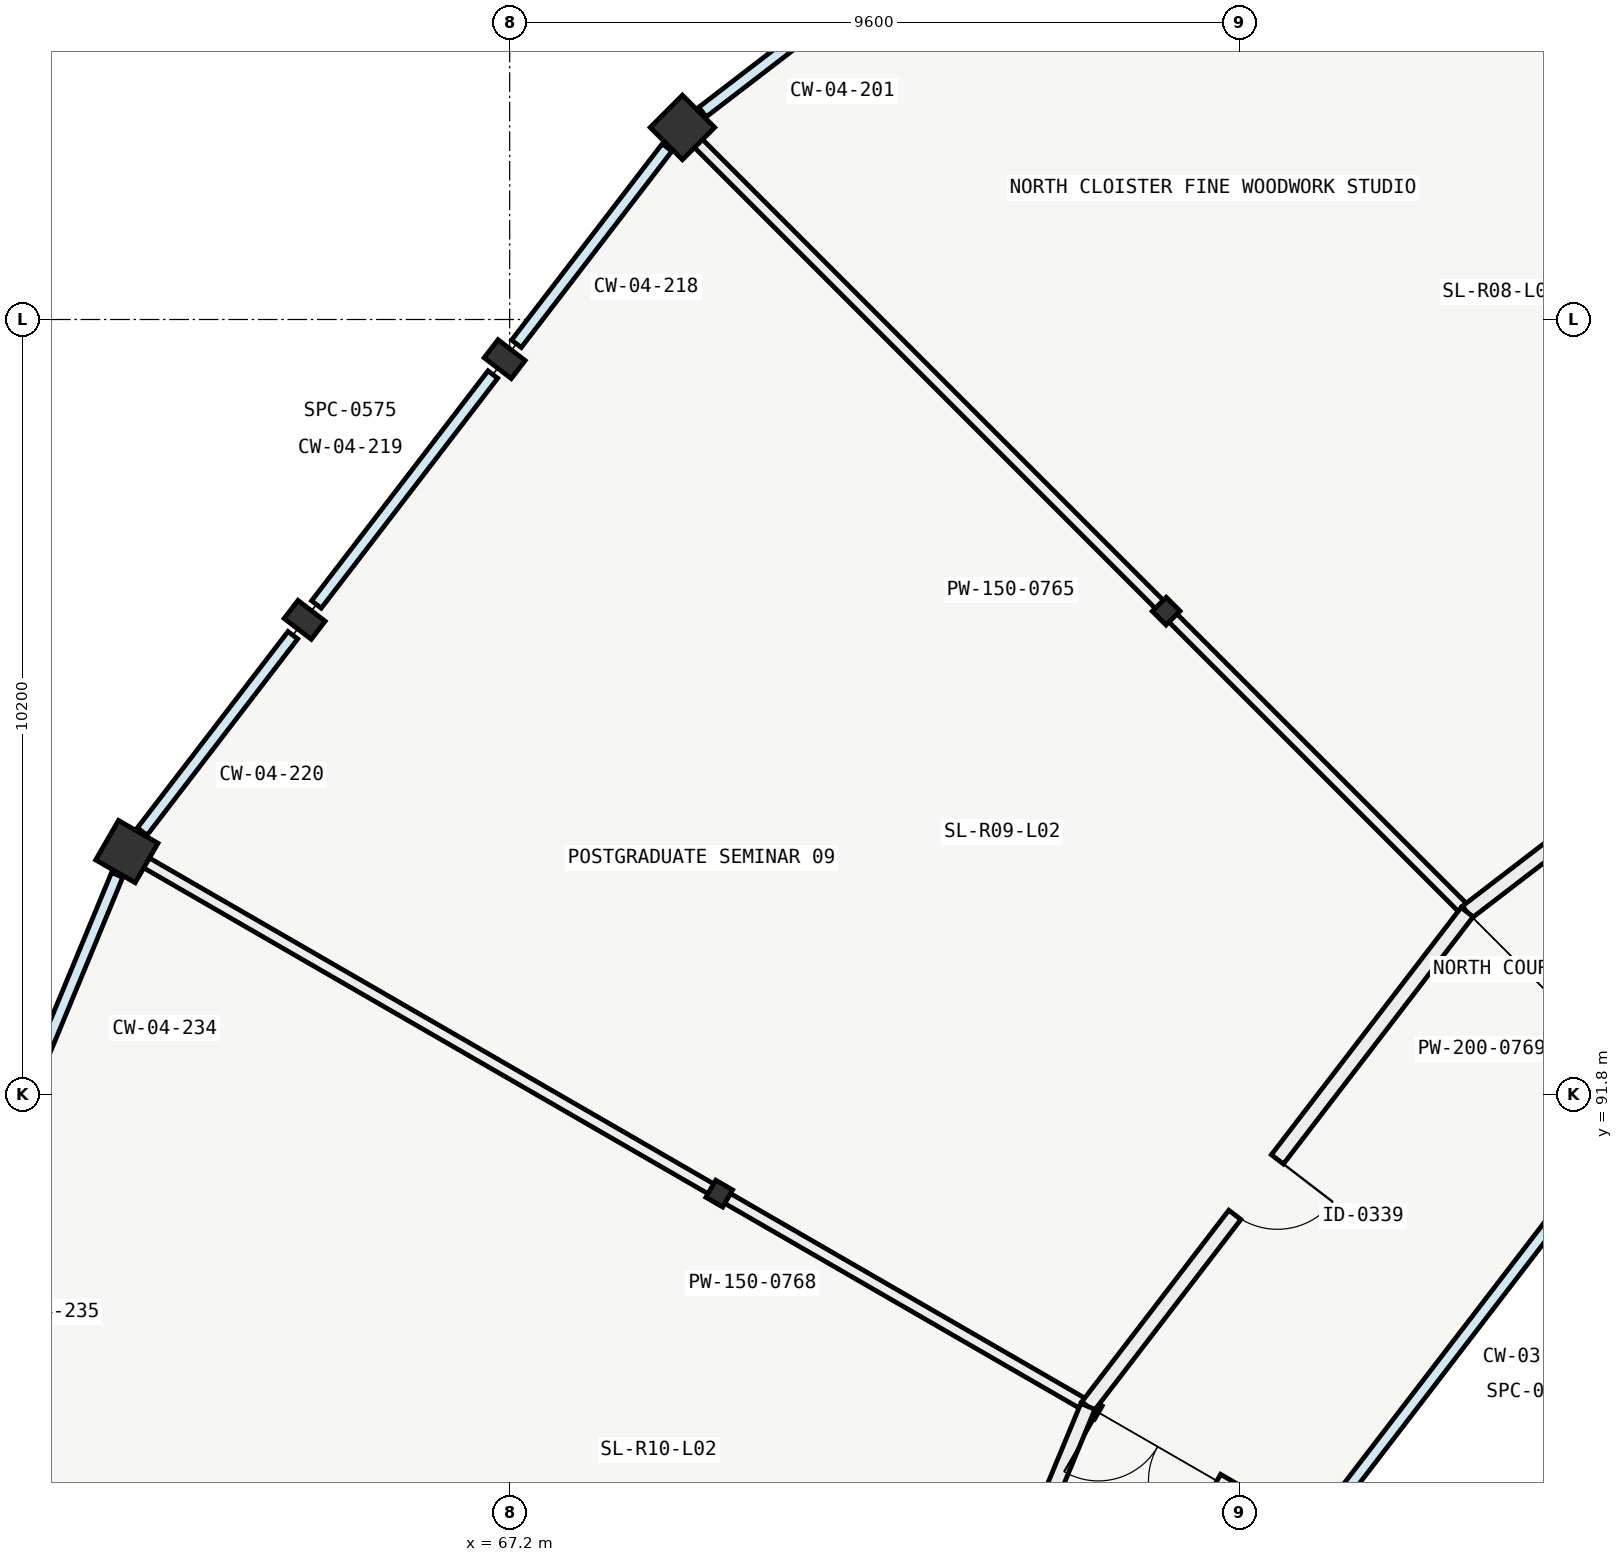
"""IFC4 building model, lengths in metres.
Left out: names, types, materials, properties, quantities, classifications, styles, units other than length and angle.
Written with IfcOpenShell. Run it as: python <this file> out.ifc"""

import sys

from ifc_helpers import new_model, si_unit, direction, frame, frame_2d, origin, origin_2d, place, context, subcontext, project, spatial, rectangle, i_section, extrude, element, fill, save


model = new_model("IFC4")
c1 = context("Model", 3, precision=1e-05, world=origin(), true_north=direction((0.0, 1.0)))
c2 = subcontext(c1, "Body", "Model", "MODEL_VIEW")
j1 = project(units=[si_unit("LENGTHUNIT", "METRE"), si_unit("PLANEANGLEUNIT", "RADIAN")], contexts=[c1])
p1 = place(None, origin())
s1 = spatial("IfcSite", under=j1, at=p1, CompositionType="ELEMENT")
p2 = place(p1, origin())
s2 = spatial("IfcBuilding", under=s1, at=p2, CompositionType="ELEMENT")
p3 = place(p2, frame((0.0, 0.0, 9.6)))
s3 = spatial("IfcBuildingStorey", under=s2, at=p3, CompositionType="ELEMENT", Elevation=9.6)
p4 = place(p3, frame((75.837, 98.163, 0.0), z_axis=(0.0, 0.0, 1.0), x_axis=(-0.707106781187, 0.707106781187, 0.0)))
e1 = element("IfcColumn", 1, at=p4, inside=s3, PredefinedType="COLUMN", context=c2, shape_type="SweptSolid", body=[
    extrude(i_section(OverallWidth=0.256, OverallDepth=0.26, WebThickness=0.01, FlangeThickness=0.017, FilletRadius=0.014, at=origin_2d()), origin(), (0.0, 0.0, 1.0), 4.2),
])
p5 = place(p3, frame((69.473, 104.527, 0.0), z_axis=(0.0, 0.0, 1.0), x_axis=(-0.707106781187, 0.707106781187, 0.0)))
e2 = element("IfcColumn", 2, at=p5, inside=s3, PredefinedType="COLUMN", context=c2, shape_type="SweptSolid", body=[
    extrude(rectangle(XDim=0.6, YDim=0.6, at=origin_2d()), origin(), (0.0, 0.0, 1.0), 4.2),
])
p6 = place(p3, frame((69.957, 90.5, 0.0), z_axis=(0.0, 0.0, 1.0), x_axis=(-0.866025403784, 0.5, 0.0)))
e3 = element("IfcColumn", 3, at=p6, inside=s3, PredefinedType="COLUMN", context=c2, shape_type="SweptSolid", body=[
    extrude(i_section(OverallWidth=0.256, OverallDepth=0.26, WebThickness=0.01, FlangeThickness=0.017, FilletRadius=0.014, at=origin_2d()), origin(), (0.0, 0.0, 1.0), 4.2),
])
p7 = place(p3, frame((62.163, 95.0, 0.0), z_axis=(0.0, 0.0, 1.0), x_axis=(-0.866025403784, 0.5, 0.0)))
e4 = element("IfcColumn", 4, at=p7, inside=s3, PredefinedType="COLUMN", context=c2, shape_type="SweptSolid", body=[
    extrude(rectangle(XDim=0.6, YDim=0.6, at=origin_2d()), origin(), (0.0, 0.0, 1.0), 4.2),
])
for number, where, z_axis, x_axis in (
    (5, (67.134, 101.478, 0.0), (0.0, 0.0, 1.0), (0.609, 0.793, 0.0)),
    (6, (64.502, 98.049, 0.0), (0.0, 0.0, 1.0), (0.609, 0.793, 0.0)),
):
    element("IfcColumn", number, at=place(p3, frame(where, z_axis=z_axis, x_axis=x_axis)), inside=s3, PredefinedType="PILASTER", context=c2, shape_type="SweptSolid", body=[
        extrude(rectangle(XDim=0.3, YDim=0.45, at=origin_2d()), origin(), (0.0, 0.0, 1.0), 4.2),
    ])
p8 = place(p3, frame((77.647, 86.06, 0.0), z_axis=(0.0, 0.0, 1.0), x_axis=(-0.866040564224, 0.499973740429, 0.0)))
e7 = element("IfcWall", 7, at=p8, inside=s3, PredefinedType="PARTITIONING", context=c2, shape_type="SweptSolid", body=[
    extrude(rectangle(XDim=3.28, YDim=0.2, at=frame_2d((1.64, 0.0))), origin(), (0.0, 0.0, 1.0), 3.402),
])
p9 = place(p8, frame((1.32, 0.0, 0.0)))
e8 = element("IfcOpeningElement", 8, at=p9, cuts=e7, PredefinedType="OPENING", context=c2, shape_type="SweptSolid", body=[
    extrude(rectangle(XDim=1.8, YDim=2.2, at=frame_2d((0.9, 1.1))), frame((0.0, 0.11, 0.0), z_axis=(0.0, -1.0, 0.0), x_axis=(1.0, 0.0, 0.0)), (0.0, 0.0, 1.0), 0.22),
])
p10 = place(p3, frame((79.797, 94.203, 0.0), z_axis=(0.0, 0.0, 1.0), x_axis=(-0.707106781187, 0.707106781187, 0.0)))
e9 = element("IfcWall", 9, at=p10, inside=s3, PredefinedType="PARTITIONING", context=c2, shape_type="SweptSolid", body=[
    extrude(rectangle(XDim=14.48, YDim=0.15, at=frame_2d((7.24, 0.0))), origin(), (0.0, 0.0, 1.0), 3.397),
])
p11 = place(p3, frame((86.3, 99.193, 0.0), z_axis=(0.0, 0.0, 1.0), x_axis=(-0.793357497113, -0.608756011694, 0.0)))
e10 = element("IfcWall", 10, at=p11, inside=s3, PredefinedType="PARTITIONING", context=c2, shape_type="SweptSolid", body=[
    extrude(rectangle(XDim=8.197, YDim=0.2, at=frame_2d((4.099, 0.0))), origin(), (0.0, 0.0, 1.0), 3.402),
])
p12 = place(p3, frame((74.807, 87.7, 0.0), z_axis=(0.0, 0.0, 1.0), x_axis=(-0.866025544155, 0.499999756871, 0.0)))
e11 = element("IfcWall", 11, at=p12, inside=s3, PredefinedType="PARTITIONING", context=c2, shape_type="SweptSolid", body=[
    extrude(rectangle(XDim=14.48, YDim=0.15, at=frame_2d((7.24, 0.0))), origin(), (0.0, 0.0, 1.0), 3.397),
])
p13 = place(p3, frame((79.797, 94.203, 0.0), z_axis=(0.0, 0.0, 1.0), x_axis=(-0.608756011694, -0.793357497113, 0.0)))
e12 = element("IfcWall", 12, at=p13, inside=s3, PredefinedType="PARTITIONING", context=c2, shape_type="SweptSolid", body=[
    extrude(rectangle(XDim=8.197, YDim=0.2, at=frame_2d((4.099, 0.0))), origin(), (0.0, 0.0, 1.0), 3.402),
])
p14 = place(p13, frame((4.1, 0.0, 0.0)))
e13 = element("IfcOpeningElement", 13, at=p14, cuts=e12, PredefinedType="OPENING", context=c2, shape_type="SweptSolid", body=[
    extrude(rectangle(XDim=0.92, YDim=2.1, at=frame_2d((0.46, 1.05))), frame((0.0, 0.11, 0.0), z_axis=(0.0, -1.0, 0.0), x_axis=(1.0, 0.0, 0.0)), (0.0, 0.0, 1.0), 0.22),
])
p15 = place(p3, frame((74.807, 87.7, 0.0), z_axis=(0.0, 0.0, 1.0), x_axis=(-0.382696385238, -0.923874167149, 0.0)))
e14 = element("IfcWall", 14, at=p15, inside=s3, PredefinedType="PARTITIONING", context=c2, shape_type="SweptSolid", body=[
    extrude(rectangle(XDim=8.197, YDim=0.2, at=frame_2d((4.099, 0.0))), origin(), (0.0, 0.0, 1.0), 3.402),
])
p16 = place(p15, frame((4.1, 0.0, 0.0)))
e15 = element("IfcOpeningElement", 15, at=p16, cuts=e14, PredefinedType="OPENING", context=c2, shape_type="SweptSolid", body=[
    extrude(rectangle(XDim=1.5, YDim=2.2, at=frame_2d((0.75, 1.1))), frame((0.0, 0.11, 0.0), z_axis=(0.0, -1.0, 0.0), x_axis=(1.0, 0.0, 0.0)), (0.0, 0.0, 1.0), 0.22),
])
p17 = place(p9, origin())
e16 = element("IfcDoor", 16, at=p17, inside=s3, OperationType="DOUBLE_DOOR_SINGLE_SWING", PredefinedType="DOOR", context=c2, shape_type="SweptSolid", body=[
    extrude(rectangle(XDim=1.8, YDim=2.2, at=frame_2d((0.9, 1.1))), frame((0.0, 0.025, 0.0), z_axis=(0.0, -1.0, 0.0), x_axis=(1.0, 0.0, 0.0)), (0.0, 0.0, 1.0), 0.05),
])
fill(e8, e16)
p18 = place(p14, origin())
e17 = element("IfcDoor", 17, at=p18, inside=s3, OperationType="SINGLE_SWING_LEFT", PredefinedType="DOOR", context=c2, shape_type="SweptSolid", body=[
    extrude(rectangle(XDim=0.92, YDim=2.1, at=frame_2d((0.46, 1.05))), frame((0.0, 0.025, 0.0), z_axis=(0.0, -1.0, 0.0), x_axis=(1.0, 0.0, 0.0)), (0.0, 0.0, 1.0), 0.05),
])
fill(e13, e17)
save(model, sys.argv[1])
